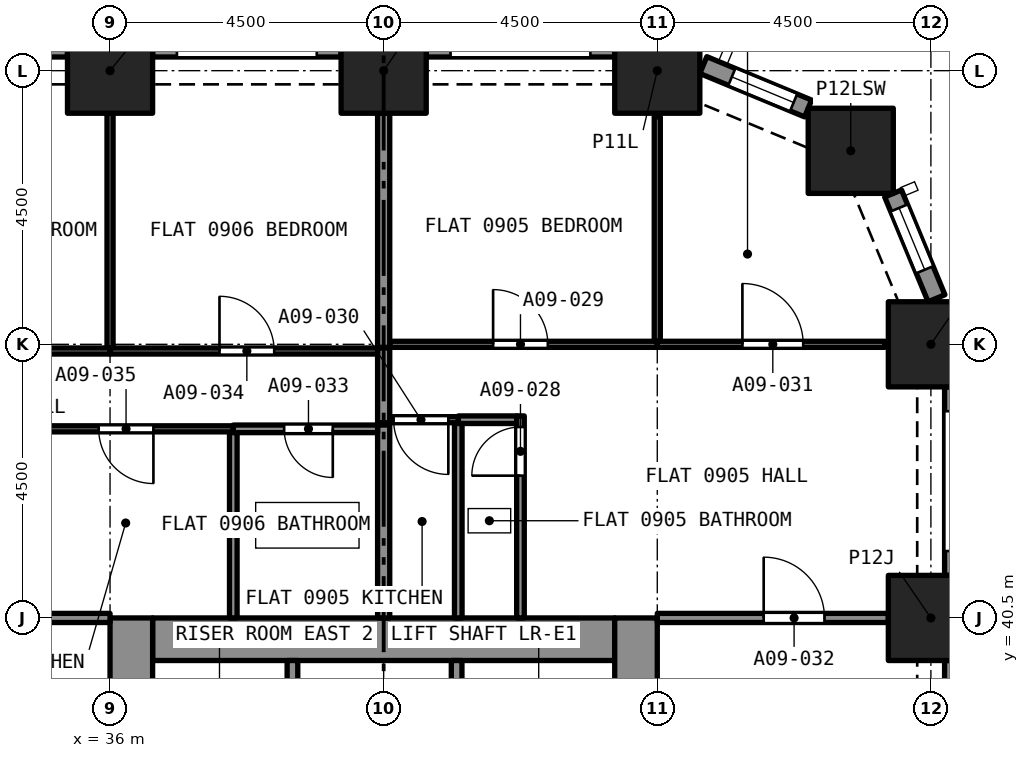
"""IFC4 building model, lengths in metres.
Left out: names, types, materials, properties, quantities, classifications, styles, units other than length and angle.
Written with IfcOpenShell. Run it as: python <this file> out.ifc"""

import sys

from ifc_helpers import new_model, si_unit, direction, frame, frame_2d, origin, origin_2d, place, context, subcontext, project, spatial, rectangle, extrude, element, fill, save


model = new_model("IFC4")
c1 = context("Model", 3, precision=1e-05, world=origin(), true_north=direction((0.0, 1.0)))
c2 = subcontext(c1, "Body", "Model", "MODEL_VIEW")
j1 = project(units=[si_unit("LENGTHUNIT", "METRE"), si_unit("PLANEANGLEUNIT", "RADIAN")], contexts=[c1])
p1 = place(None, origin())
s1 = spatial("IfcSite", under=j1, at=p1, CompositionType="ELEMENT")
p2 = place(p1, origin())
s2 = spatial("IfcBuilding", under=s1, at=p2, CompositionType="ELEMENT")
p3 = place(p2, frame((0.0, 0.0, 40.0)))
s3 = spatial("IfcBuildingStorey", under=s2, at=p3, CompositionType="ELEMENT", Elevation=40.0)
for number, where, z_axis, x_axis in (
    (1, (49.5, 40.5, 0.0), (0.0, 0.0, 1.0), (1.0, 0.0, 0.0)),
    (2, (49.5, 45.0, 0.0), (0.0, 0.0, 1.0), (1.0, 0.0, 0.0)),
    (3, (48.182, 48.182, 0.0), (0.0, 0.0, 1.0), (1.0, 0.0, 0.0)),
    (4, (36.0, 49.5, 0.0), (0.0, 0.0, 1.0), (1.0, 0.0, 0.0)),
    (5, (40.5, 49.5, 0.0), (0.0, 0.0, 1.0), (1.0, 0.0, 0.0)),
    (6, (45.0, 49.5, 0.0), (0.0, 0.0, 1.0), (1.0, 0.0, 0.0)),
):
    element("IfcColumn", number, at=place(p3, frame(where, z_axis=z_axis, x_axis=x_axis)), inside=s3, PredefinedType="COLUMN", context=c2, shape_type="SweptSolid", body=[
        extrude(rectangle(XDim=1.4, YDim=1.4, at=origin_2d()), origin(), (0.0, 0.0, 1.0), 3.2),
    ])
p4 = place(p3, frame((36.7, 40.15, 0.0), z_axis=(0.0, 0.0, 1.0), x_axis=(1.0, 0.0, 0.0)))
e7 = element("IfcWall", 7, at=p4, inside=s3, PredefinedType="SOLIDWALL", context=c2, shape_type="SweptSolid", body=[
    extrude(rectangle(XDim=7.6, YDim=0.7, at=frame_2d((3.8, 0.0))), origin(), (0.0, 0.0, 1.0), 3.2),
])
p5 = place(p3, frame((36.35, 27.0, 0.0), z_axis=(0.0, 0.0, 1.0), x_axis=(0.0, 1.0, 0.0)))
e8 = element("IfcWall", 8, at=p5, inside=s3, PredefinedType="SOLIDWALL", context=c2, shape_type="SweptSolid", body=[
    extrude(rectangle(XDim=13.5, YDim=0.7, at=frame_2d((6.75, 0.0))), origin(), (0.0, 0.0, 1.0), 3.2),
])
p6 = place(p5, frame((8.95, 0.0, 0.0)))
e9 = element("IfcOpeningElement", 9, at=p6, cuts=e8, PredefinedType="OPENING", context=c2, shape_type="SweptSolid", body=[
    extrude(rectangle(XDim=1.2, YDim=2.1, at=frame_2d((0.6, 1.05))), frame((0.0, 0.36, 0.0), z_axis=(0.0, -1.0, 0.0), x_axis=(1.0, 0.0, 0.0)), (0.0, 0.0, 1.0), 0.72),
])
p7 = place(p3, frame((44.65, 27.0, 0.0), z_axis=(0.0, 0.0, 1.0), x_axis=(0.0, 1.0, 0.0)))
e10 = element("IfcWall", 10, at=p7, inside=s3, PredefinedType="SOLIDWALL", context=c2, shape_type="SweptSolid", body=[
    extrude(rectangle(XDim=13.5, YDim=0.7, at=frame_2d((6.75, 0.0))), origin(), (0.0, 0.0, 1.0), 3.2),
])
p8 = place(p7, frame((8.95, 0.0, 0.0)))
e11 = element("IfcOpeningElement", 11, at=p8, cuts=e10, PredefinedType="OPENING", context=c2, shape_type="SweptSolid", body=[
    extrude(rectangle(XDim=1.2, YDim=2.1, at=frame_2d((0.6, 1.05))), frame((0.0, 0.36, 0.0), z_axis=(0.0, -1.0, 0.0), x_axis=(1.0, 0.0, 0.0)), (0.0, 0.0, 1.0), 0.72),
])
p9 = place(p3, frame((49.875, 39.8, 0.0), z_axis=(0.0, 0.0, 1.0), x_axis=(0.0, -1.0, 0.0)))
e12 = element("IfcWall", 12, at=p9, inside=s3, PredefinedType="SOLIDWALL", context=c2, shape_type="SweptSolid", body=[
    extrude(rectangle(XDim=3.1, YDim=0.3, at=frame_2d((1.55, 0.0))), origin(), (0.0, 0.0, 1.0), 3.2),
])
p10 = place(p9, frame((0.4, 0.0, 0.45)))
e13 = element("IfcOpeningElement", 13, at=p10, cuts=e12, PredefinedType="OPENING", context=c2, shape_type="SweptSolid", body=[
    extrude(rectangle(XDim=2.3, YDim=1.95, at=frame_2d((1.15, 0.975))), frame((0.0, 0.16, 0.0), z_axis=(0.0, -1.0, 0.0), x_axis=(1.0, 0.0, 0.0)), (0.0, 0.0, 1.0), 0.32),
])
p11 = place(p3, frame((49.875, 44.3, 0.0), z_axis=(0.0, 0.0, 1.0), x_axis=(0.0, -1.0, 0.0)))
e14 = element("IfcWall", 14, at=p11, inside=s3, PredefinedType="SOLIDWALL", context=c2, shape_type="SweptSolid", body=[
    extrude(rectangle(XDim=3.1, YDim=0.3, at=frame_2d((1.55, 0.0))), origin(), (0.0, 0.0, 1.0), 3.2),
])
p12 = place(p11, frame((0.4, 0.0, 0.45)))
e15 = element("IfcOpeningElement", 15, at=p12, cuts=e14, PredefinedType="OPENING", context=c2, shape_type="SweptSolid", body=[
    extrude(rectangle(XDim=2.3, YDim=1.95, at=frame_2d((1.15, 0.975))), frame((0.0, 0.16, 0.0), z_axis=(0.0, -1.0, 0.0), x_axis=(1.0, 0.0, 0.0)), (0.0, 0.0, 1.0), 0.32),
])
p13 = place(p3, frame((48.878, 47.48, 0.0), z_axis=(0.0, 0.0, 1.0), x_axis=(0.38262540684, -0.923903565336, 0.0)))
e16 = element("IfcWall", 16, at=p13, inside=s3, PredefinedType="SOLIDWALL", context=c2, shape_type="SweptSolid", body=[
    extrude(rectangle(XDim=1.865, YDim=0.3, at=frame_2d((0.933, 0.0))), origin(), (0.0, 0.0, 1.0), 3.2),
])
p14 = place(p13, frame((0.258, 0.0, 0.45)))
e17 = element("IfcOpeningElement", 17, at=p14, cuts=e16, PredefinedType="OPENING", context=c2, shape_type="SweptSolid", body=[
    extrude(rectangle(XDim=1.1, YDim=1.95, at=frame_2d((0.55, 0.975))), frame((0.0, 0.16, 0.0), z_axis=(0.0, -1.0, 0.0), x_axis=(1.0, 0.0, 0.0)), (0.0, 0.0, 1.0), 0.32),
])
p15 = place(p3, frame((45.757, 49.592, 0.0), z_axis=(0.0, 0.0, 1.0), x_axis=(0.923857286003, -0.382737135771, 0.0)))
e18 = element("IfcWall", 18, at=p15, inside=s3, PredefinedType="SOLIDWALL", context=c2, shape_type="SweptSolid", body=[
    extrude(rectangle(XDim=1.865, YDim=0.3, at=frame_2d((0.933, 0.0))), origin(), (0.0, 0.0, 1.0), 3.2),
])
p16 = place(p15, frame((0.508, 0.0, 0.45)))
e19 = element("IfcOpeningElement", 19, at=p16, cuts=e18, PredefinedType="OPENING", context=c2, shape_type="SweptSolid", body=[
    extrude(rectangle(XDim=1.1, YDim=1.95, at=frame_2d((0.55, 0.975))), frame((0.0, 0.16, 0.0), z_axis=(0.0, -1.0, 0.0), x_axis=(1.0, 0.0, 0.0)), (0.0, 0.0, 1.0), 0.32),
])
p17 = place(p3, frame((41.2, 49.875, 0.0), z_axis=(0.0, 0.0, 1.0), x_axis=(1.0, 0.0, 0.0)))
e20 = element("IfcWall", 20, at=p17, inside=s3, PredefinedType="SOLIDWALL", context=c2, shape_type="SweptSolid", body=[
    extrude(rectangle(XDim=3.1, YDim=0.3, at=frame_2d((1.55, 0.0))), origin(), (0.0, 0.0, 1.0), 3.2),
])
p18 = place(p17, frame((0.4, 0.0, 0.45)))
e21 = element("IfcOpeningElement", 21, at=p18, cuts=e20, PredefinedType="OPENING", context=c2, shape_type="SweptSolid", body=[
    extrude(rectangle(XDim=2.3, YDim=1.95, at=frame_2d((1.15, 0.975))), frame((0.0, 0.16, 0.0), z_axis=(0.0, -1.0, 0.0), x_axis=(1.0, 0.0, 0.0)), (0.0, 0.0, 1.0), 0.32),
])
p19 = place(p3, frame((36.7, 49.875, 0.0), z_axis=(0.0, 0.0, 1.0), x_axis=(1.0, 0.0, 0.0)))
e22 = element("IfcWall", 22, at=p19, inside=s3, PredefinedType="SOLIDWALL", context=c2, shape_type="SweptSolid", body=[
    extrude(rectangle(XDim=3.1, YDim=0.3, at=frame_2d((1.55, 0.0))), origin(), (0.0, 0.0, 1.0), 3.2),
])
p20 = place(p19, frame((0.4, 0.0, 0.45)))
e23 = element("IfcOpeningElement", 23, at=p20, cuts=e22, PredefinedType="OPENING", context=c2, shape_type="SweptSolid", body=[
    extrude(rectangle(XDim=2.3, YDim=1.95, at=frame_2d((1.15, 0.975))), frame((0.0, 0.16, 0.0), z_axis=(0.0, -1.0, 0.0), x_axis=(1.0, 0.0, 0.0)), (0.0, 0.0, 1.0), 0.32),
])
p21 = place(p3, frame((32.2, 49.875, 0.0), z_axis=(0.0, 0.0, 1.0), x_axis=(1.0, 0.0, 0.0)))
e24 = element("IfcWall", 24, at=p21, inside=s3, PredefinedType="SOLIDWALL", context=c2, shape_type="SweptSolid", body=[
    extrude(rectangle(XDim=3.1, YDim=0.3, at=frame_2d((1.55, 0.0))), origin(), (0.0, 0.0, 1.0), 3.2),
])
p22 = place(p21, frame((0.4, 0.0, 0.45)))
e25 = element("IfcOpeningElement", 25, at=p22, cuts=e24, PredefinedType="OPENING", context=c2, shape_type="SweptSolid", body=[
    extrude(rectangle(XDim=2.3, YDim=1.95, at=frame_2d((1.15, 0.975))), frame((0.0, 0.16, 0.0), z_axis=(0.0, -1.0, 0.0), x_axis=(1.0, 0.0, 0.0)), (0.0, 0.0, 1.0), 0.32),
])
p23 = place(p3, frame((41.727, 43.76, 0.0), z_axis=(0.0, 0.0, 1.0), x_axis=(1.0, 0.0, 0.0)))
e26 = element("IfcWall", 26, at=p23, inside=s3, PredefinedType="PARTITIONING", context=c2, shape_type="SweptSolid", body=[
    extrude(rectangle(XDim=0.96, YDim=0.125, at=frame_2d((0.48, 0.0))), origin(), (0.0, 0.0, 1.0), 2.9),
])
p24 = place(p3, frame((42.75, 40.5, 0.0), z_axis=(0.0, 0.0, 1.0), x_axis=(0.0, 1.0, 0.0)))
e27 = element("IfcWall", 27, at=p24, inside=s3, PredefinedType="PARTITIONING", context=c2, shape_type="SweptSolid", body=[
    extrude(rectangle(XDim=3.323, YDim=0.125, at=frame_2d((1.661, 0.0))), origin(), (0.0, 0.0, 1.0), 2.9),
])
p25 = place(p24, frame((2.34, 0.0, 0.0)))
e28 = element("IfcOpeningElement", 28, at=p25, cuts=e27, PredefinedType="OPENING", context=c2, shape_type="SweptSolid", body=[
    extrude(rectangle(XDim=0.8, YDim=2.1, at=frame_2d((0.4, 1.05))), frame((0.0, 0.073, 0.0), z_axis=(0.0, -1.0, 0.0), x_axis=(1.0, 0.0, 0.0)), (0.0, 0.0, 1.0), 0.145),
])
p26 = place(p3, frame((41.727, 40.5, 0.0), z_axis=(0.0, 0.0, 1.0), x_axis=(0.0, 1.0, 0.0)))
e29 = element("IfcWall", 29, at=p26, inside=s3, PredefinedType="PARTITIONING", context=c2, shape_type="SweptSolid", body=[
    extrude(rectangle(XDim=3.198, YDim=0.125, at=frame_2d((1.599, 0.0))), origin(), (0.0, 0.0, 1.0), 2.9),
])
p27 = place(p3, frame((40.6, 45.0, 0.0), z_axis=(0.0, 0.0, 1.0), x_axis=(1.0, 0.0, 0.0)))
e30 = element("IfcWall", 30, at=p27, inside=s3, PredefinedType="PARTITIONING", context=c2, shape_type="SweptSolid", body=[
    extrude(rectangle(XDim=4.4, YDim=0.1, at=frame_2d((2.2, 0.0))), origin(), (0.0, 0.0, 1.0), 2.9),
])
p28 = place(p27, frame((1.7, 0.0, 0.0)))
e31 = element("IfcOpeningElement", 31, at=p28, cuts=e30, PredefinedType="OPENING", context=c2, shape_type="SweptSolid", body=[
    extrude(rectangle(XDim=0.9, YDim=2.1, at=frame_2d((0.45, 1.05))), frame((0.0, 0.06, 0.0), z_axis=(0.0, -1.0, 0.0), x_axis=(1.0, 0.0, 0.0)), (0.0, 0.0, 1.0), 0.12),
])
p29 = place(p3, frame((45.0, 45.05, 0.0), z_axis=(0.0, 0.0, 1.0), x_axis=(0.0, 1.0, 0.0)))
e32 = element("IfcWall", 32, at=p29, inside=s3, PredefinedType="PARTITIONING", context=c2, shape_type="SweptSolid", body=[
    extrude(rectangle(XDim=3.692, YDim=0.1, at=frame_2d((1.846, 0.0))), origin(), (0.0, 0.0, 1.0), 2.9),
])
p30 = place(p3, frame((40.5, 44.95, 0.0), z_axis=(0.0, 0.0, 1.0), x_axis=(0.0, 1.0, 0.0)))
e33 = element("IfcWall", 33, at=p30, inside=s3, PredefinedType="PARTITIONING", context=c2, shape_type="SweptSolid", body=[
    extrude(rectangle(XDim=3.85, YDim=0.2, at=frame_2d((1.925, 0.0))), origin(), (0.0, 0.0, 1.0), 2.9),
])
p31 = place(p3, frame((41.727, 43.76, 0.0), z_axis=(0.0, 0.0, 1.0), x_axis=(-1.0, 0.0, 0.0)))
e34 = element("IfcWall", 34, at=p31, inside=s3, PredefinedType="PARTITIONING", context=c2, shape_type="SweptSolid", body=[
    extrude(rectangle(XDim=1.127, YDim=0.1, at=frame_2d((0.563, 0.0))), origin(), (0.0, 0.0, 1.0), 2.9),
])
p32 = place(p31, frame((0.164, 0.0, 0.0)))
e35 = element("IfcOpeningElement", 35, at=p32, cuts=e34, PredefinedType="OPENING", context=c2, shape_type="SweptSolid", body=[
    extrude(rectangle(XDim=0.9, YDim=2.1, at=frame_2d((0.45, 1.05))), frame((0.0, 0.06, 0.0), z_axis=(0.0, -1.0, 0.0), x_axis=(1.0, 0.0, 0.0)), (0.0, 0.0, 1.0), 0.12),
])
p33 = place(p3, frame((45.0, 45.0, 0.0), z_axis=(0.0, 0.0, 1.0), x_axis=(1.0, 0.0, 0.0)))
e36 = element("IfcWall", 36, at=p33, inside=s3, PredefinedType="PARTITIONING", context=c2, shape_type="SweptSolid", body=[
    extrude(rectangle(XDim=3.742, YDim=0.1, at=frame_2d((1.871, 0.0))), origin(), (0.0, 0.0, 1.0), 2.9),
])
p34 = place(p33, frame((1.4, 0.0, 0.0)))
e37 = element("IfcOpeningElement", 37, at=p34, cuts=e36, PredefinedType="OPENING", context=c2, shape_type="SweptSolid", body=[
    extrude(rectangle(XDim=1.0, YDim=2.1, at=frame_2d((0.5, 1.05))), frame((0.0, 0.06, 0.0), z_axis=(0.0, -1.0, 0.0), x_axis=(1.0, 0.0, 0.0)), (0.0, 0.0, 1.0), 0.12),
])
p35 = place(p3, frame((40.5, 43.71, 0.0), z_axis=(0.0, 0.0, 1.0), x_axis=(0.0, 1.0, 0.0)))
e38 = element("IfcWall", 38, at=p35, inside=s3, PredefinedType="PARTITIONING", context=c2, shape_type="SweptSolid", body=[
    extrude(rectangle(XDim=1.23, YDim=0.2, at=frame_2d((0.615, 0.0))), origin(), (0.0, 0.0, 1.0), 2.9),
])
p36 = place(p3, frame((45.0, 40.5, 0.0), z_axis=(0.0, 0.0, 1.0), x_axis=(1.0, 0.0, 0.0)))
e39 = element("IfcWall", 39, at=p36, inside=s3, PredefinedType="PARTITIONING", context=c2, shape_type="SweptSolid", body=[
    extrude(rectangle(XDim=3.8, YDim=0.15, at=frame_2d((1.9, 0.0))), origin(), (0.0, 0.0, 1.0), 2.9),
])
p37 = place(p36, frame((1.75, 0.0, 0.0)))
e40 = element("IfcOpeningElement", 40, at=p37, cuts=e39, PredefinedType="OPENING", context=c2, shape_type="SweptSolid", body=[
    extrude(rectangle(XDim=1.0, YDim=2.1, at=frame_2d((0.5, 1.05))), frame((0.0, 0.085, 0.0), z_axis=(0.0, -1.0, 0.0), x_axis=(1.0, 0.0, 0.0)), (0.0, 0.0, 1.0), 0.17),
])
p38 = place(p3, frame((40.5, 40.5, 0.0), z_axis=(0.0, 0.0, 1.0), x_axis=(0.0, 1.0, 0.0)))
e41 = element("IfcWall", 41, at=p38, inside=s3, PredefinedType="PARTITIONING", context=c2, shape_type="SweptSolid", body=[
    extrude(rectangle(XDim=3.173, YDim=0.2, at=frame_2d((1.586, 0.0))), origin(), (0.0, 0.0, 1.0), 2.9),
])
p39 = place(p3, frame((40.4, 43.61, 0.0), z_axis=(0.0, 0.0, 1.0), x_axis=(-1.0, 0.0, 0.0)))
e42 = element("IfcWall", 42, at=p39, inside=s3, PredefinedType="PARTITIONING", context=c2, shape_type="SweptSolid", body=[
    extrude(rectangle(XDim=2.373, YDim=0.125, at=frame_2d((1.187, 0.0))), origin(), (0.0, 0.0, 1.0), 2.9),
])
p40 = place(p39, frame((0.737, 0.0, 0.0)))
e43 = element("IfcOpeningElement", 43, at=p40, cuts=e42, PredefinedType="OPENING", context=c2, shape_type="SweptSolid", body=[
    extrude(rectangle(XDim=0.8, YDim=2.1, at=frame_2d((0.4, 1.05))), frame((0.0, 0.073, 0.0), z_axis=(0.0, -1.0, 0.0), x_axis=(1.0, 0.0, 0.0)), (0.0, 0.0, 1.0), 0.145),
])
p41 = place(p3, frame((38.027, 40.5, 0.0), z_axis=(0.0, 0.0, 1.0), x_axis=(0.0, 1.0, 0.0)))
e44 = element("IfcWall", 44, at=p41, inside=s3, PredefinedType="PARTITIONING", context=c2, shape_type="SweptSolid", body=[
    extrude(rectangle(XDim=3.048, YDim=0.125, at=frame_2d((1.524, 0.0))), origin(), (0.0, 0.0, 1.0), 2.9),
])
p42 = place(p3, frame((36.0, 44.89, 0.0), z_axis=(0.0, 0.0, 1.0), x_axis=(1.0, 0.0, 0.0)))
e45 = element("IfcWall", 45, at=p42, inside=s3, PredefinedType="PARTITIONING", context=c2, shape_type="SweptSolid", body=[
    extrude(rectangle(XDim=4.4, YDim=0.1, at=frame_2d((2.2, 0.0))), origin(), (0.0, 0.0, 1.0), 2.9),
])
p43 = place(p42, frame((1.8, 0.0, 0.0)))
e46 = element("IfcOpeningElement", 46, at=p43, cuts=e45, PredefinedType="OPENING", context=c2, shape_type="SweptSolid", body=[
    extrude(rectangle(XDim=0.9, YDim=2.1, at=frame_2d((0.45, 1.05))), frame((0.0, 0.06, 0.0), z_axis=(0.0, -1.0, 0.0), x_axis=(1.0, 0.0, 0.0)), (0.0, 0.0, 1.0), 0.12),
])
p44 = place(p3, frame((36.0, 44.94, 0.0), z_axis=(0.0, 0.0, 1.0), x_axis=(0.0, 1.0, 0.0)))
e47 = element("IfcWall", 47, at=p44, inside=s3, PredefinedType="PARTITIONING", context=c2, shape_type="SweptSolid", body=[
    extrude(rectangle(XDim=3.86, YDim=0.1, at=frame_2d((1.93, 0.0))), origin(), (0.0, 0.0, 1.0), 2.9),
])
p45 = place(p3, frame((38.027, 43.61, 0.0), z_axis=(0.0, 0.0, 1.0), x_axis=(-1.0, 0.0, 0.0)))
e48 = element("IfcWall", 48, at=p45, inside=s3, PredefinedType="PARTITIONING", context=c2, shape_type="SweptSolid", body=[
    extrude(rectangle(XDim=3.577, YDim=0.1, at=frame_2d((1.788, 0.0))), origin(), (0.0, 0.0, 1.0), 2.9),
])
p46 = place(p45, frame((1.313, 0.0, 0.0)))
e49 = element("IfcOpeningElement", 49, at=p46, cuts=e48, PredefinedType="OPENING", context=c2, shape_type="SweptSolid", body=[
    extrude(rectangle(XDim=0.9, YDim=2.1, at=frame_2d((0.45, 1.05))), frame((0.0, 0.06, 0.0), z_axis=(0.0, -1.0, 0.0), x_axis=(1.0, 0.0, 0.0)), (0.0, 0.0, 1.0), 0.12),
])
p47 = place(p3, frame((32.2, 44.89, 0.0), z_axis=(0.0, 0.0, 1.0), x_axis=(1.0, 0.0, 0.0)))
e50 = element("IfcWall", 50, at=p47, inside=s3, PredefinedType="PARTITIONING", context=c2, shape_type="SweptSolid", body=[
    extrude(rectangle(XDim=3.8, YDim=0.1, at=frame_2d((1.9, 0.0))), origin(), (0.0, 0.0, 1.0), 2.9),
])
p48 = place(p47, frame((1.05, 0.0, 0.0)))
e51 = element("IfcOpeningElement", 51, at=p48, cuts=e50, PredefinedType="OPENING", context=c2, shape_type="SweptSolid", body=[
    extrude(rectangle(XDim=1.0, YDim=2.1, at=frame_2d((0.5, 1.05))), frame((0.0, 0.06, 0.0), z_axis=(0.0, -1.0, 0.0), x_axis=(1.0, 0.0, 0.0)), (0.0, 0.0, 1.0), 0.12),
])
p49 = place(p3, frame((34.5, 40.5, 0.0), z_axis=(0.0, 0.0, 1.0), x_axis=(1.0, 0.0, 0.0)))
e52 = element("IfcWall", 52, at=p49, inside=s3, PredefinedType="PARTITIONING", context=c2, shape_type="SweptSolid", body=[
    extrude(rectangle(XDim=1.5, YDim=0.15, at=frame_2d((0.75, 0.0))), origin(), (0.0, 0.0, 1.0), 2.9),
])
for number, where, z_axis, x_axis in (
    (53, (41.7, 37.5, 0.0), (0.0, 0.0, 1.0), (0.0, 1.0, 0.0)),
    (54, (39.0, 37.5, 0.0), (0.0, 0.0, 1.0), (0.0, 1.0, 0.0)),
):
    element("IfcWall", number, at=place(p3, frame(where, z_axis=z_axis, x_axis=x_axis)), inside=s3, PredefinedType="SOLIDWALL", context=c2, shape_type="SweptSolid", body=[
        extrude(rectangle(XDim=2.3, YDim=0.175, at=frame_2d((1.15, 0.0))), origin(), (0.0, 0.0, 1.0), 2.9),
    ])
p50 = place(p14, origin())
e55 = element("IfcWindow", 55, at=p50, inside=s3, PartitioningType="SINGLE_PANEL", PredefinedType="WINDOW", context=c2, shape_type="SweptSolid", body=[
    extrude(rectangle(XDim=1.1, YDim=1.95, at=frame_2d((0.55, 0.975))), frame((0.0, 0.03, 0.0), z_axis=(0.0, -1.0, 0.0), x_axis=(1.0, 0.0, 0.0)), (0.0, 0.0, 1.0), 0.06),
])
fill(e17, e55)
p51 = place(p16, origin())
e56 = element("IfcWindow", 56, at=p51, inside=s3, PartitioningType="SINGLE_PANEL", PredefinedType="WINDOW", context=c2, shape_type="SweptSolid", body=[
    extrude(rectangle(XDim=1.1, YDim=1.95, at=frame_2d((0.55, 0.975))), frame((0.0, 0.03, 0.0), z_axis=(0.0, -1.0, 0.0), x_axis=(1.0, 0.0, 0.0)), (0.0, 0.0, 1.0), 0.06),
])
fill(e19, e56)
p52 = place(p25, origin())
e57 = element("IfcDoor", 57, at=p52, inside=s3, OperationType="SINGLE_SWING_RIGHT", PredefinedType="DOOR", context=c2, shape_type="SweptSolid", body=[
    extrude(rectangle(XDim=0.8, YDim=2.1, at=frame_2d((0.4, 1.05))), frame((0.0, 0.025, 0.0), z_axis=(0.0, -1.0, 0.0), x_axis=(1.0, 0.0, 0.0)), (0.0, 0.0, 1.0), 0.05),
])
fill(e28, e57)
p53 = place(p28, origin())
e58 = element("IfcDoor", 58, at=p53, inside=s3, OperationType="SINGLE_SWING_LEFT", PredefinedType="DOOR", context=c2, shape_type="SweptSolid", body=[
    extrude(rectangle(XDim=0.9, YDim=2.1, at=frame_2d((0.45, 1.05))), frame((0.0, 0.025, 0.0), z_axis=(0.0, -1.0, 0.0), x_axis=(1.0, 0.0, 0.0)), (0.0, 0.0, 1.0), 0.05),
])
fill(e31, e58)
p54 = place(p32, origin())
e59 = element("IfcDoor", 59, at=p54, inside=s3, OperationType="SINGLE_SWING_RIGHT", PredefinedType="DOOR", context=c2, shape_type="SweptSolid", body=[
    extrude(rectangle(XDim=0.9, YDim=2.1, at=frame_2d((0.45, 1.05))), frame((0.0, 0.025, 0.0), z_axis=(0.0, -1.0, 0.0), x_axis=(1.0, 0.0, 0.0)), (0.0, 0.0, 1.0), 0.05),
])
fill(e35, e59)
p55 = place(p34, origin())
e60 = element("IfcDoor", 60, at=p55, inside=s3, OperationType="SINGLE_SWING_RIGHT", PredefinedType="DOOR", context=c2, shape_type="SweptSolid", body=[
    extrude(rectangle(XDim=1.0, YDim=2.1, at=frame_2d((0.5, 1.05))), frame((0.0, 0.025, 0.0), z_axis=(0.0, -1.0, 0.0), x_axis=(1.0, 0.0, 0.0)), (0.0, 0.0, 1.0), 0.05),
])
fill(e37, e60)
p56 = place(p37, origin())
e61 = element("IfcDoor", 61, at=p56, inside=s3, OperationType="SINGLE_SWING_RIGHT", PredefinedType="DOOR", context=c2, shape_type="SweptSolid", body=[
    extrude(rectangle(XDim=1.0, YDim=2.1, at=frame_2d((0.5, 1.05))), frame((0.0, 0.025, 0.0), z_axis=(0.0, -1.0, 0.0), x_axis=(1.0, 0.0, 0.0)), (0.0, 0.0, 1.0), 0.05),
])
fill(e40, e61)
p57 = place(p40, origin())
e62 = element("IfcDoor", 62, at=p57, inside=s3, OperationType="SINGLE_SWING_LEFT", PredefinedType="DOOR", context=c2, shape_type="SweptSolid", body=[
    extrude(rectangle(XDim=0.8, YDim=2.1, at=frame_2d((0.4, 1.05))), frame((0.0, 0.025, 0.0), z_axis=(0.0, -1.0, 0.0), x_axis=(1.0, 0.0, 0.0)), (0.0, 0.0, 1.0), 0.05),
])
fill(e43, e62)
p58 = place(p43, origin())
e63 = element("IfcDoor", 63, at=p58, inside=s3, OperationType="SINGLE_SWING_RIGHT", PredefinedType="DOOR", context=c2, shape_type="SweptSolid", body=[
    extrude(rectangle(XDim=0.9, YDim=2.1, at=frame_2d((0.45, 1.05))), frame((0.0, 0.025, 0.0), z_axis=(0.0, -1.0, 0.0), x_axis=(1.0, 0.0, 0.0)), (0.0, 0.0, 1.0), 0.05),
])
fill(e46, e63)
p59 = place(p46, origin())
e64 = element("IfcDoor", 64, at=p59, inside=s3, OperationType="SINGLE_SWING_LEFT", PredefinedType="DOOR", context=c2, shape_type="SweptSolid", body=[
    extrude(rectangle(XDim=0.9, YDim=2.1, at=frame_2d((0.45, 1.05))), frame((0.0, 0.025, 0.0), z_axis=(0.0, -1.0, 0.0), x_axis=(1.0, 0.0, 0.0)), (0.0, 0.0, 1.0), 0.05),
])
fill(e49, e64)
save(model, sys.argv[1])
